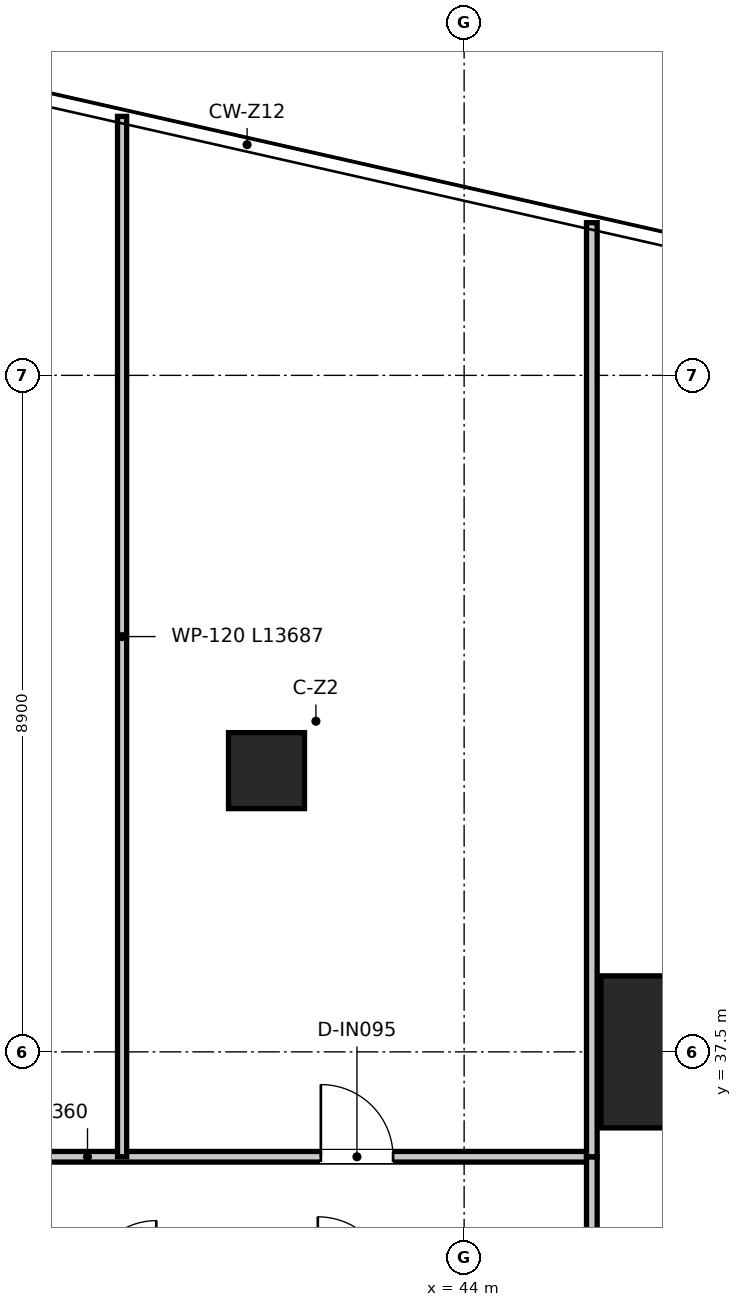
"""IFC4 building model, lengths in metres.
Left out: names, types, materials, properties, quantities, classifications, styles, units other than length and angle.
Written with IfcOpenShell. Run it as: python <this file> out.ifc"""

import sys

from ifc_helpers import new_model, si_unit, direction, frame, frame_2d, origin, origin_2d, place, context, subcontext, project, spatial, rectangle, extrude, source, transform, mapped, element, fill, save


model = new_model("IFC4")
c1 = context("Model", 3, precision=1e-05, world=origin(), true_north=direction((0.0, 1.0)))
c2 = subcontext(c1, "Body", "Model", "MODEL_VIEW")
j1 = project(units=[si_unit("LENGTHUNIT", "METRE"), si_unit("PLANEANGLEUNIT", "RADIAN")], contexts=[c1])
p1 = place(None, origin())
s1 = spatial("IfcSite", under=j1, at=p1, CompositionType="ELEMENT")
p2 = place(p1, origin())
s2 = spatial("IfcBuilding", under=s1, at=p2, CompositionType="ELEMENT")
p3 = place(p2, frame((0.0, 0.0, 90.05)))
s3 = spatial("IfcBuildingStorey", under=s2, at=p3, CompositionType="ELEMENT", Elevation=90.05)
m1 = source(origin(), c2, "Body", "SweptSolid", [
    extrude(rectangle(XDim=2.0, YDim=2.0, at=origin_2d()), origin(), (0.0, 0.0, 1.0), 3.95),
])
p4 = place(p3, frame((46.8, 37.5, 0.0), z_axis=(0.0, 0.0, 1.0), x_axis=(1.0, 0.0, 0.0)))
e1 = element("IfcColumn", 1, at=p4, inside=s3, PredefinedType="USERDEFINED", context=c2, shape_type="MappedRepresentation", body=[
    mapped(m1, transform((0.0, 0.0, 0.0), x_axis=(1.0, 0.0, 0.0), y_axis=(0.0, 1.0, 0.0), z_axis=(0.0, 0.0, 1.0), scale=1.0)),
])
m2 = source(origin(), c2, "Body", "SweptSolid", [
    extrude(rectangle(XDim=1.0, YDim=1.0, at=origin_2d()), origin(), (0.0, 0.0, 1.0), 3.95),
])
p5 = place(p3, frame((41.4, 41.2, 0.0), z_axis=(0.0, 0.0, 1.0), x_axis=(1.0, 0.0, 0.0)))
e2 = element("IfcColumn", 2, at=p5, inside=s3, PredefinedType="COLUMN", context=c2, shape_type="MappedRepresentation", body=[
    mapped(m2, transform((0.0, 0.0, 0.0), x_axis=(1.0, 0.0, 0.0), y_axis=(0.0, 1.0, 0.0), z_axis=(0.0, 0.0, 1.0), scale=1.0)),
])
p6 = place(p3, frame((26.32, 36.12, 0.0), z_axis=(0.0, 0.0, 1.0), x_axis=(1.0, 0.0, 0.0)))
e3 = element("IfcWall", 3, at=p6, inside=s3, PredefinedType="PARTITIONING", context=c2, shape_type="SweptSolid", body=[
    extrude(rectangle(XDim=19.36, YDim=0.14, at=frame_2d((9.68, 0.0))), origin(), (0.0, 0.0, 1.0), 3.08),
])
p7 = place(p6, frame((2.115, 0.0, 0.0)))
e4 = element("IfcOpeningElement", 4, at=p7, cuts=e3, PredefinedType="OPENING", context=c2, shape_type="SweptSolid", body=[
    extrude(rectangle(XDim=0.95, YDim=2.1, at=frame_2d((0.475, 1.05))), frame((0.0, 0.08, 0.0), z_axis=(0.0, -1.0, 0.0), x_axis=(1.0, 0.0, 0.0)), (0.0, 0.0, 1.0), 0.16),
])
p8 = place(p6, frame((8.705, 0.0, 0.0)))
e5 = element("IfcOpeningElement", 5, at=p8, cuts=e3, PredefinedType="OPENING", context=c2, shape_type="SweptSolid", body=[
    extrude(rectangle(XDim=0.95, YDim=2.1, at=frame_2d((0.475, 1.05))), frame((0.0, 0.08, 0.0), z_axis=(0.0, -1.0, 0.0), x_axis=(1.0, 0.0, 0.0)), (0.0, 0.0, 1.0), 0.16),
])
p9 = place(p6, frame((15.795, 0.0, 0.0)))
e6 = element("IfcOpeningElement", 6, at=p9, cuts=e3, PredefinedType="OPENING", context=c2, shape_type="SweptSolid", body=[
    extrude(rectangle(XDim=0.95, YDim=2.1, at=frame_2d((0.475, 1.05))), frame((0.0, 0.08, 0.0), z_axis=(0.0, -1.0, 0.0), x_axis=(1.0, 0.0, 0.0)), (0.0, 0.0, 1.0), 0.16),
])
p10 = place(p3, frame((45.68, 10.5, 0.0), z_axis=(0.0, 0.0, 1.0), x_axis=(0.0, 1.0, 0.0)))
e7 = element("IfcWall", 7, at=p10, inside=s3, PredefinedType="PARTITIONING", context=c2, shape_type="SweptSolid", body=[
    extrude(rectangle(XDim=25.62, YDim=0.14, at=frame_2d((12.81, 0.0))), origin(), (0.0, 0.0, 1.0), 2.97),
])
p11 = place(p10, frame((15.125, 0.0, 0.0)))
e8 = element("IfcOpeningElement", 8, at=p11, cuts=e7, PredefinedType="OPENING", context=c2, shape_type="SweptSolid", body=[
    extrude(rectangle(XDim=0.95, YDim=2.1, at=frame_2d((0.475, 1.05))), frame((0.0, 0.08, 0.0), z_axis=(0.0, -1.0, 0.0), x_axis=(1.0, 0.0, 0.0)), (0.0, 0.0, 1.0), 0.16),
])
p12 = place(p3, frame((45.68, 36.12, 0.0), z_axis=(0.0, 0.0, 1.0), x_axis=(0.0, 1.0, 0.0)))
e9 = element("IfcWall", 9, at=p12, inside=s3, PredefinedType="PARTITIONING", context=c2, shape_type="SweptSolid", body=[
    extrude(rectangle(XDim=12.289, YDim=0.14, at=frame_2d((6.145, 0.0))), origin(), (0.0, 0.0, 1.0), 2.97),
])
p13 = place(p3, frame((39.5, 36.12, 0.0), z_axis=(0.0, 0.0, 1.0), x_axis=(0.0, 1.0, 0.0)))
e10 = element("IfcWall", 10, at=p13, inside=s3, PredefinedType="PARTITIONING", context=c2, shape_type="SweptSolid", body=[
    extrude(rectangle(XDim=13.687, YDim=0.12, at=frame_2d((6.844, 0.0))), origin(), (0.0, 0.0, 1.0), 2.97),
])
p14 = place(p9, origin())
e11 = element("IfcDoor", 11, at=p14, inside=s3, OperationType="SINGLE_SWING_LEFT", PredefinedType="DOOR", context=c2, shape_type="SweptSolid", body=[
    extrude(rectangle(XDim=0.95, YDim=2.1, at=frame_2d((0.475, 1.05))), frame((0.0, 0.025, 0.0), z_axis=(0.0, -1.0, 0.0), x_axis=(1.0, 0.0, 0.0)), (0.0, 0.0, 1.0), 0.05),
])
fill(e6, e11)
save(model, sys.argv[1])
